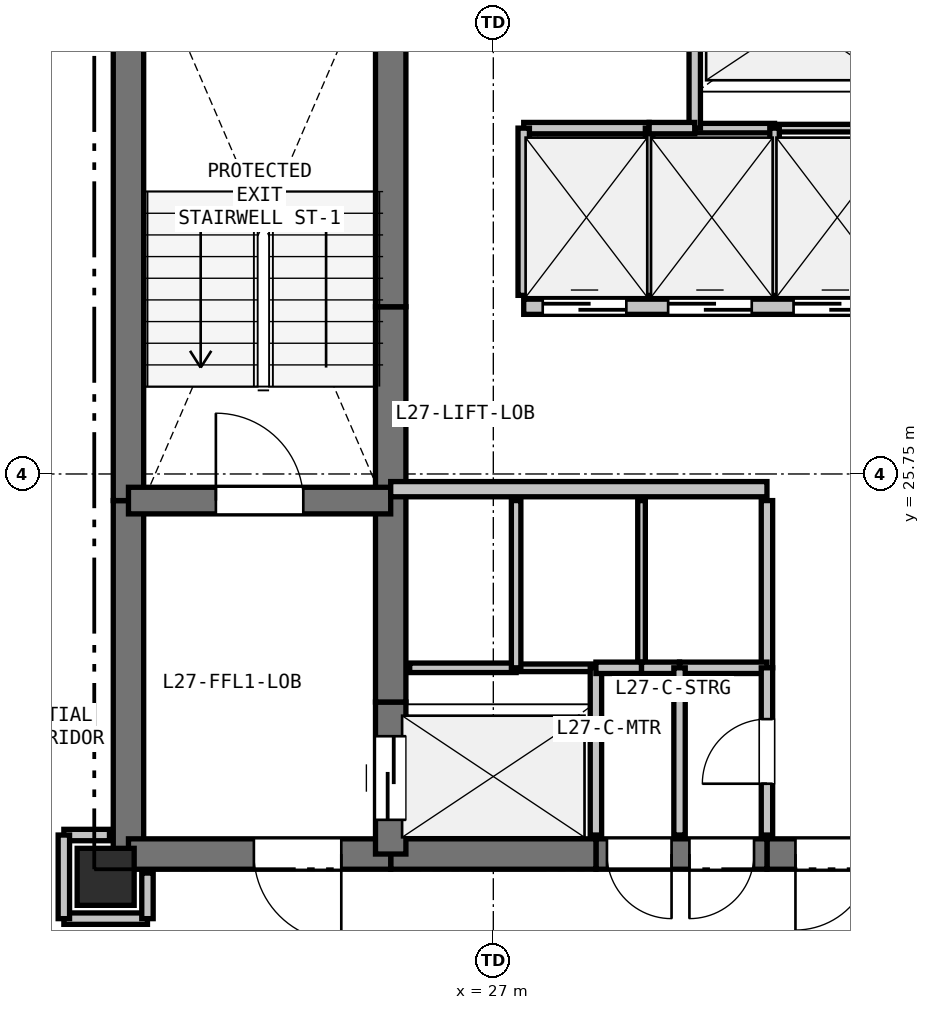
"""IFC4 building model, lengths in metres.
Left out: names, types, materials, properties, quantities, classifications, styles, units other than length and angle.
Written with IfcOpenShell. Run it as: python <this file> out.ifc"""

import sys

from ifc_helpers import new_model, si_unit, direction, frame, frame_2d, origin, origin_2d, place, context, subcontext, project, spatial, rectangle, extrude, element, fill, save


model = new_model("IFC4")
c1 = context("Model", 3, precision=1e-05, world=origin(), true_north=direction((0.0, 1.0)))
c2 = subcontext(c1, "Body", "Model", "MODEL_VIEW")
j1 = project(units=[si_unit("LENGTHUNIT", "METRE"), si_unit("PLANEANGLEUNIT", "RADIAN")], contexts=[c1])
p1 = place(None, origin())
s1 = spatial("IfcSite", under=j1, at=p1, CompositionType="ELEMENT")
p2 = place(p1, origin())
s2 = spatial("IfcBuilding", under=s1, at=p2, CompositionType="ELEMENT")
p3 = place(p2, frame((0.0, 0.0, 99.9)))
s3 = spatial("IfcBuildingStorey", under=s2, at=p3, CompositionType="ELEMENT", Elevation=99.9)
p4 = place(p3, frame((21.9, 20.45, 0.0), z_axis=(0.0, 0.0, 1.0), x_axis=(1.0, 0.0, 0.0)))
e1 = element("IfcColumn", 1, at=p4, inside=s3, PredefinedType="COLUMN", context=c2, shape_type="SweptSolid", body=[
    extrude(rectangle(XDim=0.75, YDim=0.75, at=origin_2d()), origin(), (0.0, 0.0, 1.0), 3.3),
])
p5 = place(p3, frame((22.2, 20.75, 0.0), z_axis=(0.0, 0.0, 1.0), x_axis=(0.0, 1.0, 0.0)))
e2 = element("IfcWall", 2, at=p5, inside=s3, PredefinedType="SHEAR", context=c2, shape_type="SweptSolid", body=[
    extrude(rectangle(XDim=4.65, YDim=0.4, at=frame_2d((2.325, 0.0))), origin(), (0.0, 0.0, 1.0), 3.05),
])
p6 = place(p3, frame((22.2, 25.4, 0.0), z_axis=(0.0, 0.0, 1.0), x_axis=(0.0, 1.0, 0.0)))
e3 = element("IfcWall", 3, at=p6, inside=s3, PredefinedType="SHEAR", context=c2, shape_type="SweptSolid", body=[
    extrude(rectangle(XDim=7.35, YDim=0.4, at=frame_2d((3.675, 0.0))), origin(), (0.0, 0.0, 1.0), 3.05),
])
p7 = place(p3, frame((32.35, 20.75, 0.0), z_axis=(0.0, 0.0, 1.0), x_axis=(-1.0, 0.0, 0.0)))
e4 = element("IfcWall", 4, at=p7, inside=s3, PredefinedType="SHEAR", context=c2, shape_type="SweptSolid", body=[
    extrude(rectangle(XDim=1.75, YDim=0.4, at=frame_2d((0.875, 0.0))), origin(), (0.0, 0.0, 1.0), 3.05),
])
p8 = place(p7, frame((0.375, 0.0, 0.0)))
e5 = element("IfcOpeningElement", 5, at=p8, cuts=e4, PredefinedType="OPENING", context=c2, shape_type="SweptSolid", body=[
    extrude(rectangle(XDim=1.0, YDim=2.15, at=frame_2d((0.5, 1.075))), frame((0.0, 0.21, 0.0), z_axis=(0.0, -1.0, 0.0), x_axis=(1.0, 0.0, 0.0)), (0.0, 0.0, 1.0), 0.42),
])
p9 = place(p3, frame((30.6, 20.75, 0.0), z_axis=(0.0, 0.0, 1.0), x_axis=(-1.0, 0.0, 0.0)))
e6 = element("IfcWall", 6, at=p9, inside=s3, PredefinedType="SHEAR", context=c2, shape_type="SweptSolid", body=[
    extrude(rectangle(XDim=2.25, YDim=0.4, at=frame_2d((1.125, 0.0))), origin(), (0.0, 0.0, 1.0), 3.05),
])
p10 = place(p9, frame((1.255, 0.0, 0.0)))
e7 = element("IfcOpeningElement", 7, at=p10, cuts=e6, PredefinedType="OPENING", context=c2, shape_type="SweptSolid", body=[
    extrude(rectangle(XDim=0.85, YDim=2.1, at=frame_2d((0.425, 1.05))), frame((0.0, 0.21, 0.0), z_axis=(0.0, -1.0, 0.0), x_axis=(1.0, 0.0, 0.0)), (0.0, 0.0, 1.0), 0.42),
])
p11 = place(p9, frame((0.17, 0.0, 0.0)))
e8 = element("IfcOpeningElement", 8, at=p11, cuts=e6, PredefinedType="OPENING", context=c2, shape_type="SweptSolid", body=[
    extrude(rectangle(XDim=0.85, YDim=2.1, at=frame_2d((0.425, 1.05))), frame((0.0, 0.21, 0.0), z_axis=(0.0, -1.0, 0.0), x_axis=(1.0, 0.0, 0.0)), (0.0, 0.0, 1.0), 0.42),
])
p12 = place(p3, frame((28.35, 20.75, 0.0), z_axis=(0.0, 0.0, 1.0), x_axis=(-1.0, 0.0, 0.0)))
e9 = element("IfcWall", 9, at=p12, inside=s3, PredefinedType="SHEAR", context=c2, shape_type="SweptSolid", body=[
    extrude(rectangle(XDim=2.7, YDim=0.4, at=frame_2d((1.35, 0.0))), origin(), (0.0, 0.0, 1.0), 3.05),
])
p13 = place(p3, frame((25.65, 20.75, 0.0), z_axis=(0.0, 0.0, 1.0), x_axis=(-1.0, 0.0, 0.0)))
e10 = element("IfcWall", 10, at=p13, inside=s3, PredefinedType="SHEAR", context=c2, shape_type="SweptSolid", body=[
    extrude(rectangle(XDim=3.45, YDim=0.4, at=frame_2d((1.725, 0.0))), origin(), (0.0, 0.0, 1.0), 3.05),
])
p14 = place(p13, frame((0.65, 0.0, 0.0)))
e11 = element("IfcOpeningElement", 11, at=p14, cuts=e10, PredefinedType="OPENING", context=c2, shape_type="SweptSolid", body=[
    extrude(rectangle(XDim=1.15, YDim=2.15, at=frame_2d((0.575, 1.075))), frame((0.0, 0.21, 0.0), z_axis=(0.0, -1.0, 0.0), x_axis=(1.0, 0.0, 0.0)), (0.0, 0.0, 1.0), 0.42),
])
p15 = place(p3, frame((25.65, 20.75, 0.0), z_axis=(0.0, 0.0, 1.0), x_axis=(0.0, 1.0, 0.0)))
e12 = element("IfcWall", 12, at=p15, inside=s3, PredefinedType="SHEAR", context=c2, shape_type="SweptSolid", body=[
    extrude(rectangle(XDim=2.0, YDim=0.4, at=frame_2d((1.0, 0.0))), origin(), (0.0, 0.0, 1.0), 3.05),
])
p16 = place(p15, frame((0.45, 0.0, 0.0)))
e13 = element("IfcOpeningElement", 13, at=p16, cuts=e12, PredefinedType="OPENING", context=c2, shape_type="SweptSolid", body=[
    extrude(rectangle(XDim=1.1, YDim=2.15, at=frame_2d((0.55, 1.075))), frame((0.0, 0.21, 0.0), z_axis=(0.0, -1.0, 0.0), x_axis=(1.0, 0.0, 0.0)), (0.0, 0.0, 1.0), 0.42),
])
p17 = place(p3, frame((25.65, 22.75, 0.0), z_axis=(0.0, 0.0, 1.0), x_axis=(0.0, 1.0, 0.0)))
e14 = element("IfcWall", 14, at=p17, inside=s3, PredefinedType="SHEAR", context=c2, shape_type="SweptSolid", body=[
    extrude(rectangle(XDim=2.8, YDim=0.4, at=frame_2d((1.4, 0.0))), origin(), (0.0, 0.0, 1.0), 3.05),
])
p18 = place(p3, frame((25.65, 25.55, 0.0), z_axis=(0.0, 0.0, 1.0), x_axis=(0.0, 1.0, 0.0)))
e15 = element("IfcWall", 15, at=p18, inside=s3, PredefinedType="SHEAR", context=c2, shape_type="SweptSolid", body=[
    extrude(rectangle(XDim=2.4, YDim=0.4, at=frame_2d((1.2, 0.0))), origin(), (0.0, 0.0, 1.0), 3.05),
])
p19 = place(p3, frame((25.65, 27.95, 0.0), z_axis=(0.0, 0.0, 1.0), x_axis=(0.0, 1.0, 0.0)))
e16 = element("IfcWall", 16, at=p19, inside=s3, PredefinedType="SHEAR", context=c2, shape_type="SweptSolid", body=[
    extrude(rectangle(XDim=4.8, YDim=0.4, at=frame_2d((2.4, 0.0))), origin(), (0.0, 0.0, 1.0), 3.05),
])
p20 = place(p3, frame((22.2, 25.4, 0.0), z_axis=(0.0, 0.0, 1.0), x_axis=(1.0, 0.0, 0.0)))
e17 = element("IfcWall", 17, at=p20, inside=s3, PredefinedType="SHEAR", context=c2, shape_type="SweptSolid", body=[
    extrude(rectangle(XDim=3.45, YDim=0.35, at=frame_2d((1.725, 0.0))), origin(), (0.0, 0.0, 1.0), 3.05),
])
p21 = place(p20, frame((1.15, 0.0, 0.0)))
e18 = element("IfcOpeningElement", 18, at=p21, cuts=e17, PredefinedType="OPENING", context=c2, shape_type="SweptSolid", body=[
    extrude(rectangle(XDim=1.15, YDim=2.15, at=frame_2d((0.575, 1.075))), frame((0.0, 0.185, 0.0), z_axis=(0.0, -1.0, 0.0), x_axis=(1.0, 0.0, 0.0)), (0.0, 0.0, 1.0), 0.37),
])
p22 = place(p3, frame((25.65, 25.55, 0.0), z_axis=(0.0, 0.0, 1.0), x_axis=(1.0, 0.0, 0.0)))
e19 = element("IfcWall", 19, at=p22, inside=s3, PredefinedType="PARTITIONING", context=c2, shape_type="SweptSolid", body=[
    extrude(rectangle(XDim=4.95, YDim=0.2, at=frame_2d((2.475, 0.0))), origin(), (0.0, 0.0, 1.0), 3.05),
])
p23 = place(p3, frame((27.4, 27.95, 0.0), z_axis=(0.0, 0.0, 1.0), x_axis=(1.0, 0.0, 0.0)))
e20 = element("IfcWall", 20, at=p23, inside=s3, PredefinedType="PARTITIONING", context=c2, shape_type="SweptSolid", body=[
    extrude(rectangle(XDim=4.95, YDim=0.2, at=frame_2d((2.475, 0.0))), origin(), (0.0, 0.0, 1.0), 3.05),
])
p24 = place(p23, frame((0.25, 0.0, 0.0)))
e21 = element("IfcOpeningElement", 21, at=p24, cuts=e20, PredefinedType="OPENING", context=c2, shape_type="SweptSolid", body=[
    extrude(rectangle(XDim=1.1, YDim=2.15, at=frame_2d((0.55, 1.075))), frame((0.0, 0.11, 0.0), z_axis=(0.0, -1.0, 0.0), x_axis=(1.0, 0.0, 0.0)), (0.0, 0.0, 1.0), 0.22),
])
p25 = place(p23, frame((1.9, 0.0, 0.0)))
e22 = element("IfcOpeningElement", 22, at=p25, cuts=e20, PredefinedType="OPENING", context=c2, shape_type="SweptSolid", body=[
    extrude(rectangle(XDim=1.1, YDim=2.15, at=frame_2d((0.55, 1.075))), frame((0.0, 0.11, 0.0), z_axis=(0.0, -1.0, 0.0), x_axis=(1.0, 0.0, 0.0)), (0.0, 0.0, 1.0), 0.22),
])
p26 = place(p23, frame((3.55, 0.0, 0.0)))
e23 = element("IfcOpeningElement", 23, at=p26, cuts=e20, PredefinedType="OPENING", context=c2, shape_type="SweptSolid", body=[
    extrude(rectangle(XDim=1.1, YDim=2.15, at=frame_2d((0.55, 1.075))), frame((0.0, 0.11, 0.0), z_axis=(0.0, -1.0, 0.0), x_axis=(1.0, 0.0, 0.0)), (0.0, 0.0, 1.0), 0.22),
])
p27 = place(p3, frame((25.9, 23.2, 0.0), z_axis=(0.0, 0.0, 1.0), x_axis=(1.0, 0.0, 0.0)))
e24 = element("IfcWall", 24, at=p27, inside=s3, PredefinedType="PARTITIONING", context=c2, shape_type="SweptSolid", body=[
    extrude(rectangle(XDim=1.4, YDim=0.125, at=frame_2d((0.7, 0.0))), origin(), (0.0, 0.0, 1.0), 3.05),
])
p28 = place(p3, frame((27.3, 23.2, 0.0), z_axis=(0.0, 0.0, 1.0), x_axis=(1.0, 0.0, 0.0)))
e25 = element("IfcWall", 25, at=p28, inside=s3, PredefinedType="PARTITIONING", context=c2, shape_type="SweptSolid", body=[
    extrude(rectangle(XDim=1.05, YDim=0.1, at=frame_2d((0.525, 0.0))), origin(), (0.0, 0.0, 1.0), 3.05),
])
p29 = place(p3, frame((28.35, 23.2, 0.0), z_axis=(0.0, 0.0, 1.0), x_axis=(0.0, -1.0, 0.0)))
e26 = element("IfcWall", 26, at=p29, inside=s3, PredefinedType="PARTITIONING", context=c2, shape_type="SweptSolid", body=[
    extrude(rectangle(XDim=2.2, YDim=0.15, at=frame_2d((1.1, 0.0))), origin(), (0.0, 0.0, 1.0), 3.05),
])
p30 = place(p3, frame((32.1, 30.3, 0.0), z_axis=(0.0, 0.0, 1.0), x_axis=(-1.0, 0.0, 0.0)))
e27 = element("IfcWall", 27, at=p30, inside=s3, PredefinedType="PARTITIONING", context=c2, shape_type="SweptSolid", body=[
    extrude(rectangle(XDim=1.4, YDim=0.1, at=frame_2d((0.7, 0.0))), origin(), (0.0, 0.0, 1.0), 3.05),
])
p31 = place(p3, frame((30.7, 30.3, 0.0), z_axis=(0.0, 0.0, 1.0), x_axis=(-1.0, 0.0, 0.0)))
e28 = element("IfcWall", 28, at=p31, inside=s3, PredefinedType="PARTITIONING", context=c2, shape_type="SweptSolid", body=[
    extrude(rectangle(XDim=1.05, YDim=0.125, at=frame_2d((0.525, 0.0))), origin(), (0.0, 0.0, 1.0), 3.05),
])
p32 = place(p3, frame((29.65, 30.3, 0.0), z_axis=(0.0, 0.0, 1.0), x_axis=(0.0, 1.0, 0.0)))
e29 = element("IfcWall", 29, at=p32, inside=s3, PredefinedType="PARTITIONING", context=c2, shape_type="SweptSolid", body=[
    extrude(rectangle(XDim=2.2, YDim=0.15, at=frame_2d((1.1, 0.0))), origin(), (0.0, 0.0, 1.0), 3.05),
])
p33 = place(p3, frame((27.3, 25.4, 0.0), z_axis=(0.0, 0.0, 1.0), x_axis=(0.0, -1.0, 0.0)))
e30 = element("IfcWall", 30, at=p33, inside=s3, PredefinedType="PARTITIONING", context=c2, shape_type="SweptSolid", body=[
    extrude(rectangle(XDim=2.2, YDim=0.125, at=frame_2d((1.1, 0.0))), origin(), (0.0, 0.0, 1.0), 3.05),
])
p34 = place(p3, frame((28.95, 25.4, 0.0), z_axis=(0.0, 0.0, 1.0), x_axis=(0.0, -1.0, 0.0)))
e31 = element("IfcWall", 31, at=p34, inside=s3, PredefinedType="PARTITIONING", context=c2, shape_type="SweptSolid", body=[
    extrude(rectangle(XDim=2.2, YDim=0.1, at=frame_2d((1.1, 0.0))), origin(), (0.0, 0.0, 1.0), 3.05),
])
p35 = place(p3, frame((28.95, 23.2, 0.0), z_axis=(0.0, 0.0, 1.0), x_axis=(-1.0, 0.0, 0.0)))
e32 = element("IfcWall", 32, at=p35, inside=s3, PredefinedType="PARTITIONING", context=c2, shape_type="SweptSolid", body=[
    extrude(rectangle(XDim=0.6, YDim=0.15, at=frame_2d((0.3, 0.0))), origin(), (0.0, 0.0, 1.0), 3.05),
])
p36 = place(p3, frame((30.6, 25.4, 0.0), z_axis=(0.0, 0.0, 1.0), x_axis=(0.0, -1.0, 0.0)))
e33 = element("IfcWall", 33, at=p36, inside=s3, PredefinedType="PARTITIONING", context=c2, shape_type="SweptSolid", body=[
    extrude(rectangle(XDim=2.2, YDim=0.15, at=frame_2d((1.1, 0.0))), origin(), (0.0, 0.0, 1.0), 3.05),
])
p37 = place(p3, frame((30.6, 23.2, 0.0), z_axis=(0.0, 0.0, 1.0), x_axis=(-1.0, 0.0, 0.0)))
e34 = element("IfcWall", 34, at=p37, inside=s3, PredefinedType="PARTITIONING", context=c2, shape_type="SweptSolid", body=[
    extrude(rectangle(XDim=1.15, YDim=0.15, at=frame_2d((0.575, 0.0))), origin(), (0.0, 0.0, 1.0), 3.05),
])
p38 = place(p3, frame((29.45, 23.2, 0.0), z_axis=(0.0, 0.0, 1.0), x_axis=(-1.0, 0.0, 0.0)))
e35 = element("IfcWall", 35, at=p38, inside=s3, PredefinedType="PARTITIONING", context=c2, shape_type="SweptSolid", body=[
    extrude(rectangle(XDim=0.5, YDim=0.15, at=frame_2d((0.25, 0.0))), origin(), (0.0, 0.0, 1.0), 3.05),
])
p39 = place(p3, frame((27.4, 30.3, 0.0), z_axis=(0.0, 0.0, 1.0), x_axis=(1.0, 0.0, 0.0)))
e36 = element("IfcWall", 36, at=p39, inside=s3, PredefinedType="PARTITIONING", context=c2, shape_type="SweptSolid", body=[
    extrude(rectangle(XDim=1.65, YDim=0.15, at=frame_2d((0.825, 0.0))), origin(), (0.0, 0.0, 1.0), 3.05),
])
p40 = place(p3, frame((29.05, 30.3, 0.0), z_axis=(0.0, 0.0, 1.0), x_axis=(0.0, -1.0, 0.0)))
e37 = element("IfcWall", 37, at=p40, inside=s3, PredefinedType="PARTITIONING", context=c2, shape_type="SweptSolid", body=[
    extrude(rectangle(XDim=2.2, YDim=0.1, at=frame_2d((1.1, 0.0))), origin(), (0.0, 0.0, 1.0), 3.05),
])
p41 = place(p3, frame((27.4, 28.1, 0.0), z_axis=(0.0, 0.0, 1.0), x_axis=(0.0, 1.0, 0.0)))
e38 = element("IfcWall", 38, at=p41, inside=s3, PredefinedType="PARTITIONING", context=c2, shape_type="SweptSolid", body=[
    extrude(rectangle(XDim=2.2, YDim=0.15, at=frame_2d((1.1, 0.0))), origin(), (0.0, 0.0, 1.0), 3.05),
])
p42 = place(p3, frame((29.05, 30.3, 0.0), z_axis=(0.0, 0.0, 1.0), x_axis=(1.0, 0.0, 0.0)))
e39 = element("IfcWall", 39, at=p42, inside=s3, PredefinedType="PARTITIONING", context=c2, shape_type="SweptSolid", body=[
    extrude(rectangle(XDim=0.6, YDim=0.15, at=frame_2d((0.3, 0.0))), origin(), (0.0, 0.0, 1.0), 3.05),
])
p43 = place(p3, frame((30.7, 30.3, 0.0), z_axis=(0.0, 0.0, 1.0), x_axis=(0.0, -1.0, 0.0)))
e40 = element("IfcWall", 40, at=p43, inside=s3, PredefinedType="PARTITIONING", context=c2, shape_type="SweptSolid", body=[
    extrude(rectangle(XDim=2.2, YDim=0.125, at=frame_2d((1.1, 0.0))), origin(), (0.0, 0.0, 1.0), 3.05),
])
p44 = place(p3, frame((30.6, 21.0, 0.0), z_axis=(0.0, 0.0, 1.0), x_axis=(0.0, 1.0, 0.0)))
e41 = element("IfcWall", 41, at=p44, inside=s3, PredefinedType="PARTITIONING", context=c2, shape_type="SweptSolid", body=[
    extrude(rectangle(XDim=2.2, YDim=0.15, at=frame_2d((1.1, 0.0))), origin(), (0.0, 0.0, 1.0), 3.05),
])
p45 = place(p44, frame((0.675, 0.0, 0.0)))
e42 = element("IfcOpeningElement", 42, at=p45, cuts=e41, PredefinedType="OPENING", context=c2, shape_type="SweptSolid", body=[
    extrude(rectangle(XDim=0.85, YDim=2.1, at=frame_2d((0.425, 1.05))), frame((0.0, 0.085, 0.0), z_axis=(0.0, -1.0, 0.0), x_axis=(1.0, 0.0, 0.0)), (0.0, 0.0, 1.0), 0.17),
])
p46 = place(p3, frame((21.35, 19.9, 0.0), z_axis=(0.0, 0.0, 1.0), x_axis=(1.0, 0.0, 0.0)))
e43 = element("IfcWall", 43, at=p46, inside=s3, PredefinedType="PARTITIONING", context=c2, shape_type="SweptSolid", body=[
    extrude(rectangle(XDim=1.1, YDim=0.15, at=frame_2d((0.55, 0.0))), origin(), (0.0, 0.0, 1.0), 2.423),
])
p47 = place(p3, frame((22.45, 19.9, 0.0), z_axis=(0.0, 0.0, 1.0), x_axis=(0.0, 1.0, 0.0)))
e44 = element("IfcWall", 44, at=p47, inside=s3, PredefinedType="PARTITIONING", context=c2, shape_type="SweptSolid", body=[
    extrude(rectangle(XDim=0.6, YDim=0.15, at=frame_2d((0.3, 0.0))), origin(), (0.0, 0.0, 1.0), 2.423),
])
p48 = place(p3, frame((21.95, 21.0, 0.0), z_axis=(0.0, 0.0, 1.0), x_axis=(-1.0, 0.0, 0.0)))
e45 = element("IfcWall", 45, at=p48, inside=s3, PredefinedType="PARTITIONING", context=c2, shape_type="SweptSolid", body=[
    extrude(rectangle(XDim=0.6, YDim=0.15, at=frame_2d((0.3, 0.0))), origin(), (0.0, 0.0, 1.0), 2.498),
])
p49 = place(p3, frame((21.35, 21.0, 0.0), z_axis=(0.0, 0.0, 1.0), x_axis=(0.0, -1.0, 0.0)))
e46 = element("IfcWall", 46, at=p49, inside=s3, PredefinedType="PARTITIONING", context=c2, shape_type="SweptSolid", body=[
    extrude(rectangle(XDim=1.1, YDim=0.15, at=frame_2d((0.55, 0.0))), origin(), (0.0, 0.0, 1.0), 2.423),
])
p50 = place(p3, frame((29.45, 23.2, 0.0), z_axis=(0.0, 0.0, 1.0), x_axis=(0.0, -1.0, 0.0)))
e47 = element("IfcWall", 47, at=p50, inside=s3, PredefinedType="PARTITIONING", context=c2, shape_type="SweptSolid", body=[
    extrude(rectangle(XDim=2.2, YDim=0.15, at=frame_2d((1.1, 0.0))), origin(), (0.0, 0.0, 1.0), 3.05),
])
p51 = place(p24, origin())
e48 = element("IfcDoor", 48, at=p51, inside=s3, OperationType="SLIDING_TO_LEFT", PredefinedType="DOOR", context=c2, shape_type="SweptSolid", body=[
    extrude(rectangle(XDim=1.1, YDim=2.15, at=frame_2d((0.55, 1.075))), frame((0.0, 0.025, 0.0), z_axis=(0.0, -1.0, 0.0), x_axis=(1.0, 0.0, 0.0)), (0.0, 0.0, 1.0), 0.05),
])
fill(e21, e48)
p52 = place(p25, origin())
e49 = element("IfcDoor", 49, at=p52, inside=s3, OperationType="SLIDING_TO_LEFT", PredefinedType="DOOR", context=c2, shape_type="SweptSolid", body=[
    extrude(rectangle(XDim=1.1, YDim=2.15, at=frame_2d((0.55, 1.075))), frame((0.0, 0.025, 0.0), z_axis=(0.0, -1.0, 0.0), x_axis=(1.0, 0.0, 0.0)), (0.0, 0.0, 1.0), 0.05),
])
fill(e22, e49)
p53 = place(p26, origin())
e50 = element("IfcDoor", 50, at=p53, inside=s3, OperationType="SLIDING_TO_LEFT", PredefinedType="DOOR", context=c2, shape_type="SweptSolid", body=[
    extrude(rectangle(XDim=1.1, YDim=2.15, at=frame_2d((0.55, 1.075))), frame((0.0, 0.025, 0.0), z_axis=(0.0, -1.0, 0.0), x_axis=(1.0, 0.0, 0.0)), (0.0, 0.0, 1.0), 0.05),
])
fill(e23, e50)
p54 = place(p8, origin())
e51 = element("IfcDoor", 51, at=p54, inside=s3, OperationType="SINGLE_SWING_RIGHT", PredefinedType="DOOR", context=c2, shape_type="SweptSolid", body=[
    extrude(rectangle(XDim=1.0, YDim=2.15, at=frame_2d((0.5, 1.075))), frame((0.0, 0.025, 0.0), z_axis=(0.0, -1.0, 0.0), x_axis=(1.0, 0.0, 0.0)), (0.0, 0.0, 1.0), 0.05),
])
fill(e5, e51)
p55 = place(p16, origin())
e52 = element("IfcDoor", 52, at=p55, inside=s3, OperationType="SLIDING_TO_LEFT", PredefinedType="DOOR", context=c2, shape_type="SweptSolid", body=[
    extrude(rectangle(XDim=1.1, YDim=2.15, at=frame_2d((0.55, 1.075))), frame((0.0, 0.025, 0.0), z_axis=(0.0, -1.0, 0.0), x_axis=(1.0, 0.0, 0.0)), (0.0, 0.0, 1.0), 0.05),
])
fill(e13, e52)
p56 = place(p21, origin())
e53 = element("IfcDoor", 53, at=p56, inside=s3, OperationType="SINGLE_SWING_LEFT", PredefinedType="DOOR", context=c2, shape_type="SweptSolid", body=[
    extrude(rectangle(XDim=1.15, YDim=2.15, at=frame_2d((0.575, 1.075))), frame((0.0, 0.025, 0.0), z_axis=(0.0, -1.0, 0.0), x_axis=(1.0, 0.0, 0.0)), (0.0, 0.0, 1.0), 0.05),
])
fill(e18, e53)
p57 = place(p14, origin())
e54 = element("IfcDoor", 54, at=p57, inside=s3, OperationType="SINGLE_SWING_LEFT", PredefinedType="DOOR", context=c2, shape_type="SweptSolid", body=[
    extrude(rectangle(XDim=1.15, YDim=2.15, at=frame_2d((0.575, 1.075))), frame((0.0, 0.025, 0.0), z_axis=(0.0, -1.0, 0.0), x_axis=(1.0, 0.0, 0.0)), (0.0, 0.0, 1.0), 0.05),
])
fill(e11, e54)
p58 = place(p45, origin())
e55 = element("IfcDoor", 55, at=p58, inside=s3, OperationType="SINGLE_SWING_LEFT", PredefinedType="DOOR", context=c2, shape_type="SweptSolid", body=[
    extrude(rectangle(XDim=0.85, YDim=2.1, at=frame_2d((0.425, 1.05))), frame((0.0, 0.025, 0.0), z_axis=(0.0, -1.0, 0.0), x_axis=(1.0, 0.0, 0.0)), (0.0, 0.0, 1.0), 0.05),
])
fill(e42, e55)
p59 = place(p10, origin())
e56 = element("IfcDoor", 56, at=p59, inside=s3, OperationType="SINGLE_SWING_LEFT", PredefinedType="DOOR", context=c2, shape_type="SweptSolid", body=[
    extrude(rectangle(XDim=0.85, YDim=2.1, at=frame_2d((0.425, 1.05))), frame((0.0, 0.025, 0.0), z_axis=(0.0, -1.0, 0.0), x_axis=(1.0, 0.0, 0.0)), (0.0, 0.0, 1.0), 0.05),
])
fill(e7, e56)
p60 = place(p11, origin())
e57 = element("IfcDoor", 57, at=p60, inside=s3, OperationType="SINGLE_SWING_RIGHT", PredefinedType="DOOR", context=c2, shape_type="SweptSolid", body=[
    extrude(rectangle(XDim=0.85, YDim=2.1, at=frame_2d((0.425, 1.05))), frame((0.0, 0.025, 0.0), z_axis=(0.0, -1.0, 0.0), x_axis=(1.0, 0.0, 0.0)), (0.0, 0.0, 1.0), 0.05),
])
fill(e8, e57)
save(model, sys.argv[1])
